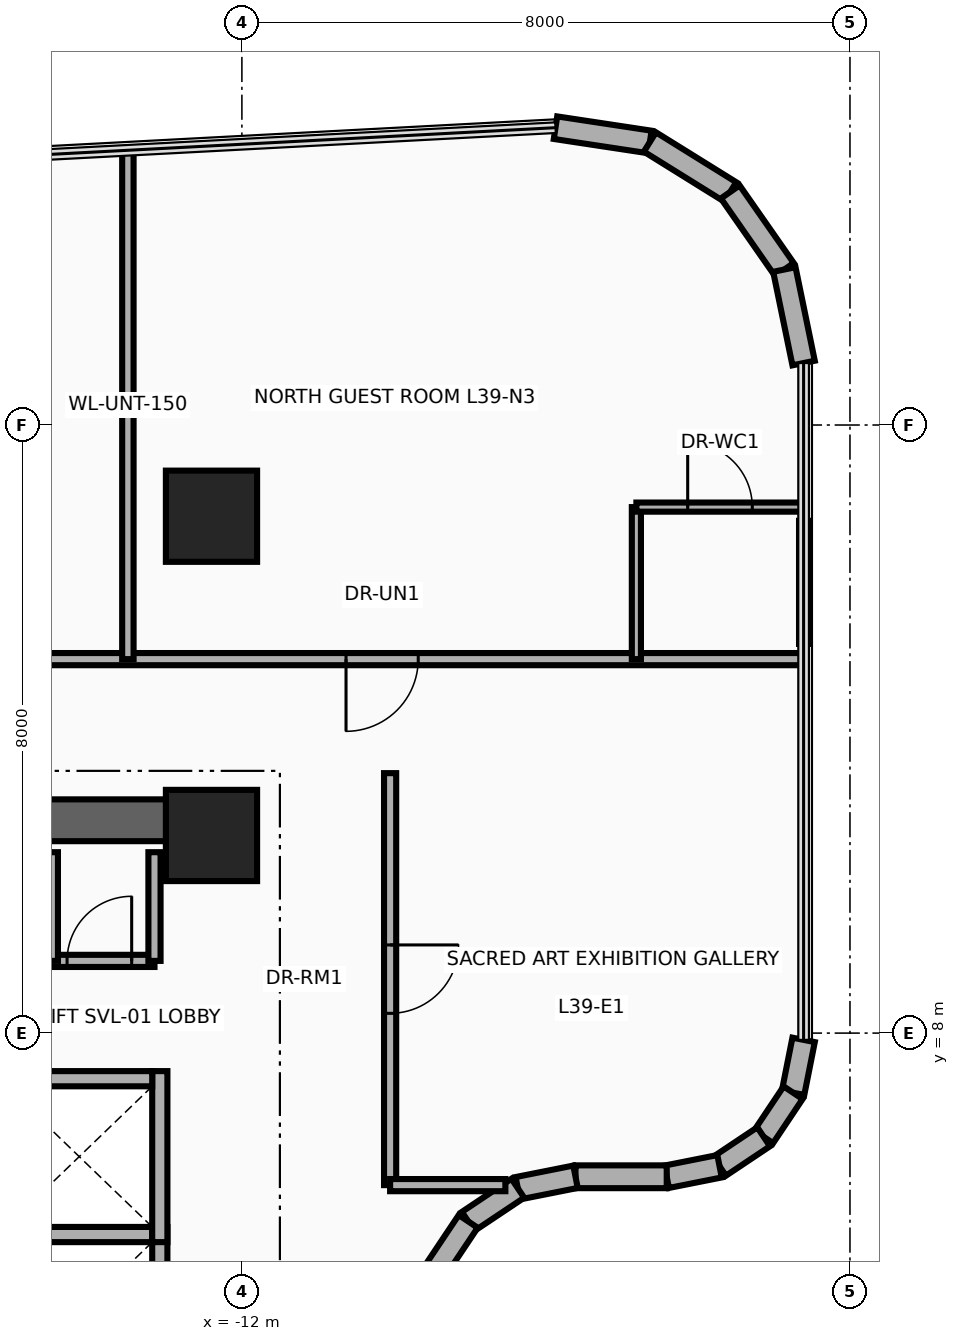
"""IFC4 building model, lengths in metres.
Left out: names, types, materials, properties, quantities, classifications, styles, units other than length and angle.
Written with IfcOpenShell. Run it as: python <this file> out.ifc"""

import sys

from ifc_helpers import new_model, si_unit, direction, frame, frame_2d, origin, origin_2d, place, context, subcontext, project, spatial, rectangle, extrude, source, transform, mapped, element, fill, save


model = new_model("IFC4")
c1 = context("Model", 3, precision=1e-05, world=origin(), true_north=direction((0.0, 1.0)))
c2 = subcontext(c1, "Body", "Model", "MODEL_VIEW")
j1 = project(units=[si_unit("LENGTHUNIT", "METRE"), si_unit("PLANEANGLEUNIT", "RADIAN")], contexts=[c1])
p1 = place(None, origin())
s1 = spatial("IfcSite", under=j1, at=p1, CompositionType="ELEMENT")
p2 = place(p1, origin())
s2 = spatial("IfcBuilding", under=s1, at=p2, CompositionType="ELEMENT")
p3 = place(p2, frame((0.0, 0.0, 153.8)))
s3 = spatial("IfcBuildingStorey", under=s2, at=p3, CompositionType="ELEMENT", Elevation=153.8)
p4 = place(p3, frame((-22.65, 10.8, 0.0), z_axis=(0.0, 0.0, 1.0), x_axis=(1.0, 0.0, 0.0)))
e1 = element("IfcWall", 1, at=p4, inside=s3, PredefinedType="SHEAR", context=c2, shape_type="SweptSolid", body=[
    extrude(rectangle(XDim=10.25, YDim=0.55, at=frame_2d((5.125, 0.0))), origin(), (0.0, 0.0, 1.0), 3.46),
])
m1 = source(origin(), c2, "Body", "SweptSolid", [
    extrude(rectangle(XDim=1.2, YDim=1.2, at=origin_2d()), origin(), (0.0, 0.0, 1.0), 3.7),
])
for number, where, z_axis, x_axis in (
    (2, (-12.4, 10.6, 0.0), (0.0, 0.0, 1.0), (1.0, 0.0, 0.0)),
    (3, (-12.4, 14.8, 0.0), (0.0, 0.0, 1.0), (1.0, 0.0, 0.0)),
):
    element("IfcColumn", number, at=place(p3, frame(where, z_axis=z_axis, x_axis=x_axis)), inside=s3, PredefinedType="COLUMN", context=c2, shape_type="MappedRepresentation", body=[
        mapped(m1, transform((0.0, 0.0, 0.0), x_axis=(1.0, 0.0, 0.0), y_axis=(0.0, 1.0, 0.0), z_axis=(0.0, 0.0, 1.0), scale=1.0)),
    ])
p5 = place(p3, frame((-7.874, 19.912, 0.0), z_axis=(0.0, 0.0, 1.0), x_axis=(0.988741655411, -0.149632679769, 0.0)))
e4 = element("IfcWall", 4, at=p5, inside=s3, PredefinedType="SOLIDWALL", context=c2, shape_type="SweptSolid", body=[
    extrude(rectangle(XDim=1.256, YDim=0.3, at=frame_2d((0.628, 0.0))), origin(), (0.0, 0.0, 1.0), 3.46),
])
p6 = place(p3, frame((-6.632, 19.724, 0.0), z_axis=(0.0, 0.0, 1.0), x_axis=(0.849285325289, -0.527934121126, 0.0)))
e5 = element("IfcWall", 5, at=p6, inside=s3, PredefinedType="SOLIDWALL", context=c2, shape_type="SweptSolid", body=[
    extrude(rectangle(XDim=1.244, YDim=0.3, at=frame_2d((0.622, 0.0))), origin(), (0.0, 0.0, 1.0), 3.46),
])
p7 = place(p3, frame((-5.575, 19.067, 0.0), z_axis=(0.0, 0.0, 1.0), x_axis=(0.571960670617, -0.820281044074, 0.0)))
e6 = element("IfcWall", 6, at=p7, inside=s3, PredefinedType="SOLIDWALL", context=c2, shape_type="SweptSolid", body=[
    extrude(rectangle(XDim=1.245, YDim=0.3, at=frame_2d((0.622, 0.0))), origin(), (0.0, 0.0, 1.0), 3.46),
])
p8 = place(p3, frame((-4.863, 18.046, 0.0), z_axis=(0.0, 0.0, 1.0), x_axis=(0.201532282172, -0.97948187285, 0.0)))
e7 = element("IfcWall", 7, at=p8, inside=s3, PredefinedType="SOLIDWALL", context=c2, shape_type="SweptSolid", body=[
    extrude(rectangle(XDim=1.256, YDim=0.3, at=frame_2d((0.628, 0.0))), origin(), (0.0, 0.0, 1.0), 3.46),
])
p9 = place(p3, frame((-4.61, 7.911, 0.0), z_axis=(0.0, 0.0, 1.0), x_axis=(-0.194989739953, -0.980805282058, 0.0)))
e8 = element("IfcWall", 8, at=p9, inside=s3, PredefinedType="SOLIDWALL", context=c2, shape_type="SweptSolid", body=[
    extrude(rectangle(XDim=0.709, YDim=0.3, at=frame_2d((0.354, 0.0))), origin(), (0.0, 0.0, 1.0), 3.46),
])
for number, where, z_axis, x_axis in (
    (9, (-4.748, 7.216, 0.0), (0.0, 0.0, 1.0), (-0.555, -0.832, 0.0)),
    (10, (-5.136, 6.636, 0.0), (0.0, 0.0, 1.0), (-0.832, -0.555, 0.0)),
):
    element("IfcWall", number, at=place(p3, frame(where, z_axis=z_axis, x_axis=x_axis)), inside=s3, PredefinedType="SOLIDWALL", context=c2, shape_type="SweptSolid", body=[
        extrude(rectangle(XDim=0.698, YDim=0.3, at=frame_2d((0.349, 0.0))), origin(), (0.0, 0.0, 1.0), 3.46),
    ])
p10 = place(p3, frame((-5.716, 6.248, 0.0), z_axis=(0.0, 0.0, 1.0), x_axis=(-0.980805282058, -0.194989739953, 0.0)))
e11 = element("IfcWall", 11, at=p10, inside=s3, PredefinedType="SOLIDWALL", context=c2, shape_type="SweptSolid", body=[
    extrude(rectangle(XDim=0.709, YDim=0.3, at=frame_2d((0.354, 0.0))), origin(), (0.0, 0.0, 1.0), 3.46),
])
p11 = place(p3, frame((-6.411, 6.11, 0.0), z_axis=(0.0, 0.0, 1.0), x_axis=(-1.0, 0.0, 0.0)))
e12 = element("IfcWall", 12, at=p11, inside=s3, PredefinedType="SOLIDWALL", context=c2, shape_type="SweptSolid", body=[
    extrude(rectangle(XDim=1.2, YDim=0.3, at=frame_2d((0.6, 0.0))), origin(), (0.0, 0.0, 1.0), 3.46),
])
p12 = place(p3, frame((-7.611, 6.11, 0.0), z_axis=(0.0, 0.0, 1.0), x_axis=(-0.98076219082, -0.195206365311, 0.0)))
e13 = element("IfcWall", 13, at=p12, inside=s3, PredefinedType="SOLIDWALL", context=c2, shape_type="SweptSolid", body=[
    extrude(rectangle(XDim=0.774, YDim=0.3, at=frame_2d((0.387, 0.0))), origin(), (0.0, 0.0, 1.0), 3.46),
])
for number, where, z_axis, x_axis in (
    (14, (-8.37, 5.959, 0.0), (0.0, 0.0, 1.0), (-0.831, -0.556, 0.0)),
    (15, (-9.023, 5.523, 0.0), (0.0, 0.0, 1.0), (-0.556, -0.831, 0.0)),
):
    element("IfcWall", number, at=place(p3, frame(where, z_axis=z_axis, x_axis=x_axis)), inside=s3, PredefinedType="SOLIDWALL", context=c2, shape_type="SweptSolid", body=[
        extrude(rectangle(XDim=0.785, YDim=0.3, at=frame_2d((0.393, 0.0))), origin(), (0.0, 0.0, 1.0), 3.46),
    ])
p13 = place(p3, frame((-13.08, 3.2, 0.0), z_axis=(0.0, 0.0, 1.0), x_axis=(0.0, 1.0, 0.0)))
e16 = element("IfcWall", 16, at=p13, inside=s3, PredefinedType="MOVABLE", context=c2, shape_type="SweptSolid", body=[
    extrude(rectangle(XDim=2.25, YDim=0.2, at=frame_2d((1.125, 0.0))), origin(), (0.0, 0.0, 1.0), 3.46),
])
p14 = place(p3, frame((-15.1, 5.35, 0.0), z_axis=(0.0, 0.0, 1.0), x_axis=(1.0, 0.0, 0.0)))
e17 = element("IfcWall", 17, at=p14, inside=s3, PredefinedType="MOVABLE", context=c2, shape_type="SweptSolid", body=[
    extrude(rectangle(XDim=1.92, YDim=0.2, at=frame_2d((0.96, 0.0))), origin(), (0.0, 0.0, 1.0), 3.46),
])
p15 = place(p3, frame((-13.08, 5.25, 0.0), z_axis=(0.0, 0.0, 1.0), x_axis=(0.0, 1.0, 0.0)))
e18 = element("IfcWall", 18, at=p15, inside=s3, PredefinedType="MOVABLE", context=c2, shape_type="SweptSolid", body=[
    extrude(rectangle(XDim=2.25, YDim=0.2, at=frame_2d((1.125, 0.0))), origin(), (0.0, 0.0, 1.0), 3.46),
])
p16 = place(p3, frame((-15.1, 7.4, 0.0), z_axis=(0.0, 0.0, 1.0), x_axis=(1.0, 0.0, 0.0)))
e19 = element("IfcWall", 19, at=p16, inside=s3, PredefinedType="MOVABLE", context=c2, shape_type="SweptSolid", body=[
    extrude(rectangle(XDim=1.92, YDim=0.2, at=frame_2d((0.96, 0.0))), origin(), (0.0, 0.0, 1.0), 3.46),
])
p17 = place(p3, frame((-18.65, 8.95, 0.0), z_axis=(0.0, 0.0, 1.0), x_axis=(1.0, 0.0, 0.0)))
e20 = element("IfcWall", 20, at=p17, inside=s3, PredefinedType="PARTITIONING", context=c2, shape_type="SweptSolid", body=[
    extrude(rectangle(XDim=5.5, YDim=0.16, at=frame_2d((2.75, 0.0))), origin(), (0.0, 0.0, 1.0), 3.46),
])
p18 = place(p17, frame((0.3, 0.0, 0.0)))
e21 = element("IfcOpeningElement", 21, at=p18, cuts=e20, PredefinedType="OPENING", context=c2, shape_type="SweptSolid", body=[
    extrude(rectangle(XDim=0.85, YDim=2.05, at=frame_2d((0.425, 1.025))), frame((0.0, 0.095, 0.0), z_axis=(0.0, -1.0, 0.0), x_axis=(1.0, 0.0, 0.0)), (0.0, 0.0, 1.0), 0.19),
])
p19 = place(p17, frame((1.55, 0.0, 0.0)))
e22 = element("IfcOpeningElement", 22, at=p19, cuts=e20, PredefinedType="OPENING", context=c2, shape_type="SweptSolid", body=[
    extrude(rectangle(XDim=0.85, YDim=2.05, at=frame_2d((0.425, 1.025))), frame((0.0, 0.095, 0.0), z_axis=(0.0, -1.0, 0.0), x_axis=(1.0, 0.0, 0.0)), (0.0, 0.0, 1.0), 0.19),
])
p20 = place(p17, frame((2.95, 0.0, 0.0)))
e23 = element("IfcOpeningElement", 23, at=p20, cuts=e20, PredefinedType="OPENING", context=c2, shape_type="SweptSolid", body=[
    extrude(rectangle(XDim=0.85, YDim=2.05, at=frame_2d((0.425, 1.025))), frame((0.0, 0.095, 0.0), z_axis=(0.0, -1.0, 0.0), x_axis=(1.0, 0.0, 0.0)), (0.0, 0.0, 1.0), 0.19),
])
p21 = place(p17, frame((4.35, 0.0, 0.0)))
e24 = element("IfcOpeningElement", 24, at=p21, cuts=e20, PredefinedType="OPENING", context=c2, shape_type="SweptSolid", body=[
    extrude(rectangle(XDim=0.85, YDim=2.05, at=frame_2d((0.425, 1.025))), frame((0.0, 0.095, 0.0), z_axis=(0.0, -1.0, 0.0), x_axis=(1.0, 0.0, 0.0)), (0.0, 0.0, 1.0), 0.19),
])
for number, where, z_axis, x_axis in (
    (25, (-13.15, 8.95, 0.0), (0.0, 0.0, 1.0), (0.0, 1.0, 0.0)),
    (26, (-14.5, 8.95, 0.0), (0.0, 0.0, 1.0), (0.0, 1.0, 0.0)),
):
    element("IfcWall", number, at=place(p3, frame(where, z_axis=z_axis, x_axis=x_axis)), inside=s3, PredefinedType="PARTITIONING", context=c2, shape_type="SweptSolid", body=[
        extrude(rectangle(XDim=1.43, YDim=0.16, at=frame_2d((0.715, 0.0))), origin(), (0.0, 0.0, 1.0), 3.46),
    ])
p22 = place(p3, frame((-28.25, 12.92, 0.0), z_axis=(0.0, 0.0, 1.0), x_axis=(1.0, 0.0, 0.0)))
e27 = element("IfcWall", 27, at=p22, inside=s3, PredefinedType="PARTITIONING", context=c2, shape_type="SweptSolid", body=[
    extrude(rectangle(XDim=23.64, YDim=0.16, at=frame_2d((11.82, 0.0))), origin(), (0.0, 0.0, 1.0), 2.834),
])
p23 = place(p22, frame((2.75, 0.0, 0.0)))
e28 = element("IfcOpeningElement", 28, at=p23, cuts=e27, PredefinedType="OPENING", context=c2, shape_type="SweptSolid", body=[
    extrude(rectangle(XDim=0.95, YDim=2.15, at=frame_2d((0.475, 1.075))), frame((0.0, 0.095, 0.0), z_axis=(0.0, -1.0, 0.0), x_axis=(1.0, 0.0, 0.0)), (0.0, 0.0, 1.0), 0.19),
])
p24 = place(p22, frame((10.125, 0.0, 0.0)))
e29 = element("IfcOpeningElement", 29, at=p24, cuts=e27, PredefinedType="OPENING", context=c2, shape_type="SweptSolid", body=[
    extrude(rectangle(XDim=0.95, YDim=2.15, at=frame_2d((0.475, 1.075))), frame((0.0, 0.095, 0.0), z_axis=(0.0, -1.0, 0.0), x_axis=(1.0, 0.0, 0.0)), (0.0, 0.0, 1.0), 0.19),
])
p25 = place(p22, frame((17.62, 0.0, 0.0)))
e30 = element("IfcOpeningElement", 30, at=p25, cuts=e27, PredefinedType="OPENING", context=c2, shape_type="SweptSolid", body=[
    extrude(rectangle(XDim=0.95, YDim=2.15, at=frame_2d((0.475, 1.075))), frame((0.0, 0.095, 0.0), z_axis=(0.0, -1.0, 0.0), x_axis=(1.0, 0.0, 0.0)), (0.0, 0.0, 1.0), 0.19),
])
p26 = place(p3, frame((-13.5, 12.92, 0.0), z_axis=(0.0, 0.0, 1.0), x_axis=(0.0, 1.0, 0.0)))
e31 = element("IfcWall", 31, at=p26, inside=s3, PredefinedType="PARTITIONING", context=c2, shape_type="SweptSolid", body=[
    extrude(rectangle(XDim=6.694, YDim=0.15, at=frame_2d((3.347, 0.0))), origin(), (0.0, 0.0, 1.0), 2.666),
])
p27 = place(p3, frame((-6.81, 12.92, 0.0), z_axis=(0.0, 0.0, 1.0), x_axis=(0.0, 1.0, 0.0)))
e32 = element("IfcWall", 32, at=p27, inside=s3, PredefinedType="PARTITIONING", context=c2, shape_type="SweptSolid", body=[
    extrude(rectangle(XDim=2.0, YDim=0.12, at=frame_2d((1.0, 0.0))), origin(), (0.0, 0.0, 1.0), 3.46),
])
p28 = place(p3, frame((-6.81, 14.92, 0.0), z_axis=(0.0, 0.0, 1.0), x_axis=(1.0, 0.0, 0.0)))
e33 = element("IfcWall", 33, at=p28, inside=s3, PredefinedType="PARTITIONING", context=c2, shape_type="SweptSolid", body=[
    extrude(rectangle(XDim=2.2, YDim=0.12, at=frame_2d((1.1, 0.0))), origin(), (0.0, 0.0, 1.0), 3.46),
])
p29 = place(p28, frame((0.675, 0.0, 0.0)))
e34 = element("IfcOpeningElement", 34, at=p29, cuts=e33, PredefinedType="OPENING", context=c2, shape_type="SweptSolid", body=[
    extrude(rectangle(XDim=0.85, YDim=2.1, at=frame_2d((0.425, 1.05))), frame((0.0, 0.075, 0.0), z_axis=(0.0, -1.0, 0.0), x_axis=(1.0, 0.0, 0.0)), (0.0, 0.0, 1.0), 0.15),
])
p30 = place(p3, frame((-4.61, 13.12, 0.0), z_axis=(0.0, 0.0, 1.0), x_axis=(0.0, 1.0, 0.0)))
e35 = element("IfcWall", 35, at=p30, inside=s3, PredefinedType="PARTITIONING", context=c2, shape_type="SweptSolid", body=[
    extrude(rectangle(XDim=1.62, YDim=0.12, at=frame_2d((0.81, 0.0))), origin(), (0.0, 0.0, 1.0), 3.46),
])
p31 = place(p3, frame((-10.05, 6.0, 0.0), z_axis=(0.0, 0.0, 1.0), x_axis=(0.0, 1.0, 0.0)))
e36 = element("IfcWall", 36, at=p31, inside=s3, PredefinedType="PARTITIONING", context=c2, shape_type="SweptSolid", body=[
    extrude(rectangle(XDim=5.42, YDim=0.16, at=frame_2d((2.71, 0.0))), origin(), (0.0, 0.0, 1.0), 3.46),
])
p32 = place(p31, frame((2.26, 0.0, 0.0)))
e37 = element("IfcOpeningElement", 37, at=p32, cuts=e36, PredefinedType="OPENING", context=c2, shape_type="SweptSolid", body=[
    extrude(rectangle(XDim=0.9, YDim=2.1, at=frame_2d((0.45, 1.05))), frame((0.0, 0.095, 0.0), z_axis=(0.0, -1.0, 0.0), x_axis=(1.0, 0.0, 0.0)), (0.0, 0.0, 1.0), 0.19),
])
p33 = place(p3, frame((-10.05, 6.0, 0.0), z_axis=(0.0, 0.0, 1.0), x_axis=(1.0, 0.0, 0.0)))
e38 = element("IfcWall", 38, at=p33, inside=s3, PredefinedType="PARTITIONING", context=c2, shape_type="SweptSolid", body=[
    extrude(rectangle(XDim=1.516, YDim=0.16, at=frame_2d((0.758, 0.0))), origin(), (0.0, 0.0, 1.0), 3.46),
])
p34 = place(p21, origin())
e39 = element("IfcDoor", 39, at=p34, inside=s3, OperationType="SINGLE_SWING_RIGHT", PredefinedType="DOOR", context=c2, shape_type="SweptSolid", body=[
    extrude(rectangle(XDim=0.85, YDim=2.05, at=frame_2d((0.425, 1.025))), frame((0.0, 0.025, 0.0), z_axis=(0.0, -1.0, 0.0), x_axis=(1.0, 0.0, 0.0)), (0.0, 0.0, 1.0), 0.05),
])
fill(e24, e39)
p35 = place(p25, frame((0.95, 0.0, 0.0), z_axis=(0.0, 0.0, 1.0), x_axis=(-1.0, 0.0, 0.0)))
e40 = element("IfcDoor", 40, at=p35, inside=s3, OperationType="SINGLE_SWING_LEFT", PredefinedType="DOOR", context=c2, shape_type="SweptSolid", body=[
    extrude(rectangle(XDim=0.95, YDim=2.15, at=frame_2d((0.475, 1.075))), frame((0.0, 0.025, 0.0), z_axis=(0.0, -1.0, 0.0), x_axis=(1.0, 0.0, 0.0)), (0.0, 0.0, 1.0), 0.05),
])
fill(e30, e40)
p36 = place(p29, origin())
e41 = element("IfcDoor", 41, at=p36, inside=s3, OperationType="SINGLE_SWING_RIGHT", PredefinedType="DOOR", context=c2, shape_type="SweptSolid", body=[
    extrude(rectangle(XDim=0.85, YDim=2.1, at=frame_2d((0.425, 1.05))), frame((0.0, 0.025, 0.0), z_axis=(0.0, -1.0, 0.0), x_axis=(1.0, 0.0, 0.0)), (0.0, 0.0, 1.0), 0.05),
])
fill(e34, e41)
p37 = place(p32, frame((0.9, 0.0, 0.0), z_axis=(0.0, 0.0, 1.0), x_axis=(-1.0, 0.0, 0.0)))
e42 = element("IfcDoor", 42, at=p37, inside=s3, OperationType="SINGLE_SWING_LEFT", PredefinedType="DOOR", context=c2, shape_type="SweptSolid", body=[
    extrude(rectangle(XDim=0.9, YDim=2.1, at=frame_2d((0.45, 1.05))), frame((0.0, 0.025, 0.0), z_axis=(0.0, -1.0, 0.0), x_axis=(1.0, 0.0, 0.0)), (0.0, 0.0, 1.0), 0.05),
])
fill(e37, e42)
save(model, sys.argv[1])
